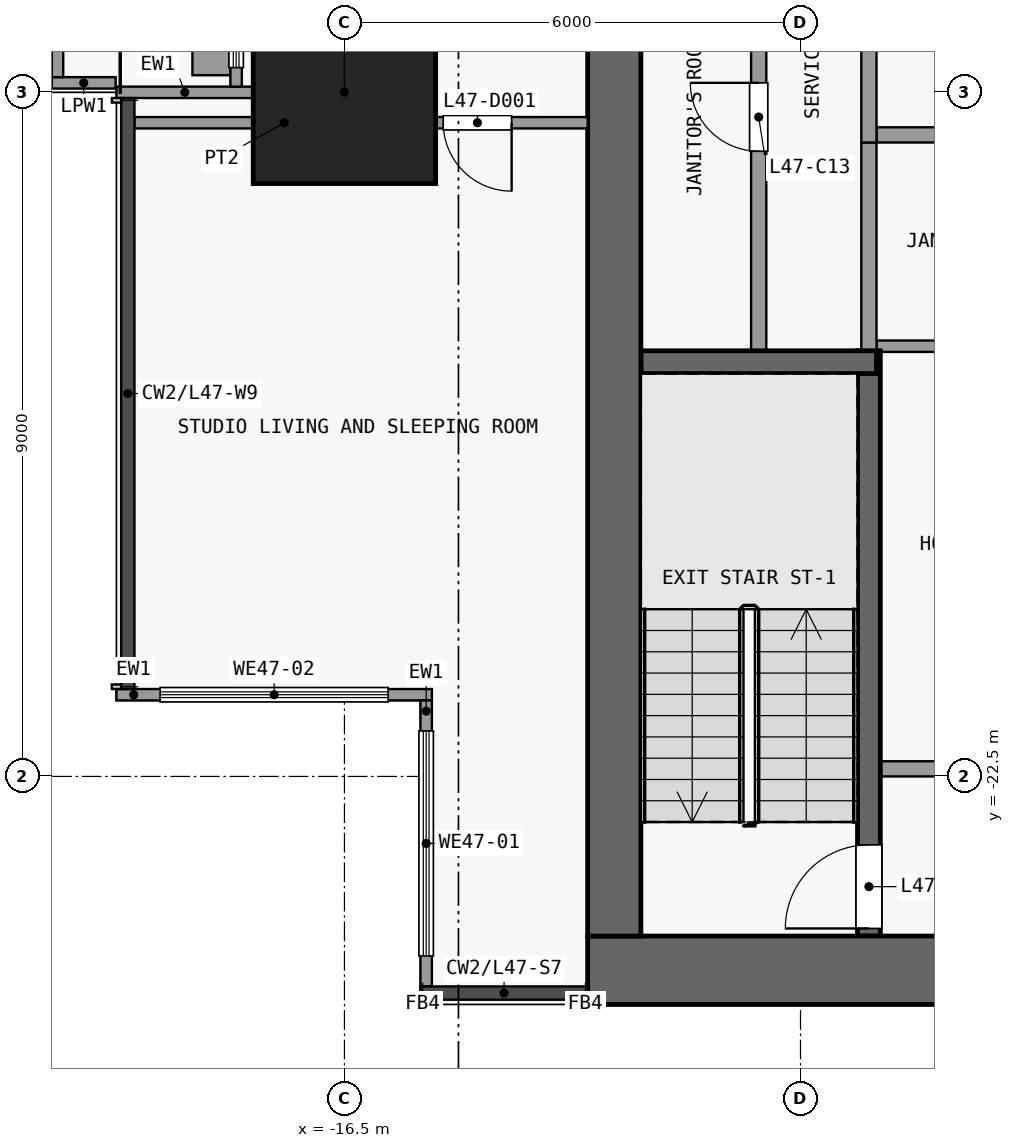
"""IFC4 building model, lengths in metres.
Left out: names, types, materials, properties, quantities, classifications, styles, units other than length and angle.
Written with IfcOpenShell. Run it as: python <this file> out.ifc"""

import sys

from ifc_helpers import new_model, si_unit, direction, frame, frame_2d, origin, origin_2d, place, context, subcontext, project, spatial, rectangle, extrude, element, fill, save


model = new_model("IFC4")
c1 = context("Model", 3, precision=1e-05, world=origin(), true_north=direction((0.0, 1.0)))
c2 = subcontext(c1, "Body", "Model", "MODEL_VIEW")
j1 = project(units=[si_unit("LENGTHUNIT", "METRE"), si_unit("PLANEANGLEUNIT", "RADIAN")], contexts=[c1])
p1 = place(None, origin())
s1 = spatial("IfcSite", under=j1, at=p1, CompositionType="ELEMENT")
p2 = place(p1, origin())
s2 = spatial("IfcBuilding", under=s1, at=p2, CompositionType="ELEMENT")
p3 = place(p2, frame((0.0, 0.0, 188.9)))
s3 = spatial("IfcBuildingStorey", under=s2, at=p3, CompositionType="ELEMENT", Elevation=188.9)
p4 = place(p3, frame((-16.5, -13.5, 0.0), z_axis=(0.0, 0.0, 1.0), x_axis=(1.0, 0.0, 0.0)))
e1 = element("IfcColumn", 1, at=p4, inside=s3, PredefinedType="COLUMN", context=c2, shape_type="SweptSolid", body=[
    extrude(rectangle(XDim=2.4, YDim=2.4, at=origin_2d()), origin(), (0.0, 0.0, 1.0), 3.6),
])
p5 = place(p3, frame((-13.3, -25.05, 0.0), z_axis=(0.0, 0.0, 1.0), x_axis=(1.0, 0.0, 0.0)))
e2 = element("IfcWall", 2, at=p5, inside=s3, PredefinedType="SHEAR", context=c2, shape_type="SweptSolid", body=[
    extrude(rectangle(XDim=26.6, YDim=0.9, at=frame_2d((13.3, 0.0))), origin(), (0.0, 0.0, 1.0), 3.3),
])
p6 = place(p3, frame((-12.95, -24.6, 0.0), z_axis=(0.0, 0.0, 1.0), x_axis=(0.0, 1.0, 0.0)))
e3 = element("IfcWall", 3, at=p6, inside=s3, PredefinedType="SHEAR", context=c2, shape_type="SweptSolid", body=[
    extrude(rectangle(XDim=16.1, YDim=0.7, at=frame_2d((8.05, 0.0))), origin(), (0.0, 0.0, 1.0), 3.3),
])
p7 = place(p3, frame((-3.25, -22.4, 0.0), z_axis=(0.0, 0.0, 1.0), x_axis=(-1.0, 0.0, 0.0)))
e4 = element("IfcWall", 4, at=p7, inside=s3, PredefinedType="PARTITIONING", context=c2, shape_type="SweptSolid", body=[
    extrude(rectangle(XDim=6.2, YDim=0.2, at=frame_2d((3.1, 0.0))), origin(), (0.0, 0.0, 1.0), 3.3),
])
p8 = place(p7, frame((0.8, 0.0, 0.0)))
e5 = element("IfcOpeningElement", 5, at=p8, cuts=e4, PredefinedType="OPENING", context=c2, shape_type="SweptSolid", body=[
    extrude(rectangle(XDim=1.5, YDim=2.1, at=frame_2d((0.75, 1.05))), frame((0.0, 0.11, 0.0), z_axis=(0.0, -1.0, 0.0), x_axis=(1.0, 0.0, 0.0)), (0.0, 0.0, 1.0), 0.22),
])
p9 = place(p3, frame((-12.6, -17.05, 0.0), z_axis=(0.0, 0.0, 1.0), x_axis=(1.0, 0.0, 0.0)))
e6 = element("IfcWall", 6, at=p9, inside=s3, PredefinedType="SHEAR", context=c2, shape_type="SweptSolid", body=[
    extrude(rectangle(XDim=3.1, YDim=0.3, at=frame_2d((1.55, 0.0))), origin(), (0.0, 0.0, 1.0), 3.3),
])
p10 = place(p3, frame((-9.5, -16.84, 0.0), z_axis=(0.0, 0.0, 1.0), x_axis=(1.0, 0.0, 0.0)))
e7 = element("IfcWall", 7, at=p10, inside=s3, PredefinedType="PARTITIONING", context=c2, shape_type="SweptSolid", body=[
    extrude(rectangle(XDim=2.925, YDim=0.15, at=frame_2d((1.462, 0.0))), origin(), (0.0, 0.0, 1.0), 3.3),
])
p11 = place(p3, frame((-9.5, -14.06, 0.0), z_axis=(0.0, 0.0, 1.0), x_axis=(1.0, 0.0, 0.0)))
e8 = element("IfcWall", 8, at=p11, inside=s3, PredefinedType="PARTITIONING", context=c2, shape_type="SweptSolid", body=[
    extrude(rectangle(XDim=2.9, YDim=0.2, at=frame_2d((1.45, 0.0))), origin(), (0.0, 0.0, 1.0), 3.3),
])
p12 = place(p3, frame((-11.05, -16.9, 0.0), z_axis=(0.0, 0.0, 1.0), x_axis=(0.0, 1.0, 0.0)))
e9 = element("IfcWall", 9, at=p12, inside=s3, PredefinedType="PARTITIONING", context=c2, shape_type="SweptSolid", body=[
    extrude(rectangle(XDim=6.4, YDim=0.2, at=frame_2d((3.2, 0.0))), origin(), (0.0, 0.0, 1.0), 3.3),
])
p13 = place(p12, frame((2.625, 0.0, 0.0)))
e10 = element("IfcOpeningElement", 10, at=p13, cuts=e9, PredefinedType="OPENING", context=c2, shape_type="SweptSolid", body=[
    extrude(rectangle(XDim=0.9, YDim=2.1, at=frame_2d((0.45, 1.05))), frame((0.0, 0.11, 0.0), z_axis=(0.0, -1.0, 0.0), x_axis=(1.0, 0.0, 0.0)), (0.0, 0.0, 1.0), 0.22),
])
p14 = place(p3, frame((-9.6, -24.6, 0.0), z_axis=(0.0, 0.0, 1.0), x_axis=(0.0, 1.0, 0.0)))
e11 = element("IfcWall", 11, at=p14, inside=s3, PredefinedType="SHEAR", context=c2, shape_type="SweptSolid", body=[
    extrude(rectangle(XDim=7.7, YDim=0.3, at=frame_2d((3.85, 0.0))), origin(), (0.0, 0.0, 1.0), 3.3),
])
p15 = place(p14, frame((0.1, 0.0, 0.0)))
e12 = element("IfcOpeningElement", 12, at=p15, cuts=e11, PredefinedType="OPENING", context=c2, shape_type="SweptSolid", body=[
    extrude(rectangle(XDim=1.1, YDim=2.1, at=frame_2d((0.55, 1.05))), frame((0.0, 0.16, 0.0), z_axis=(0.0, -1.0, 0.0), x_axis=(1.0, 0.0, 0.0)), (0.0, 0.0, 1.0), 0.32),
])
p16 = place(p3, frame((-9.6, -16.9, 0.0), z_axis=(0.0, 0.0, 1.0), x_axis=(0.0, 1.0, 0.0)))
e13 = element("IfcWall", 13, at=p16, inside=s3, PredefinedType="PARTITIONING", context=c2, shape_type="SweptSolid", body=[
    extrude(rectangle(XDim=2.74, YDim=0.2, at=frame_2d((1.37, 0.0))), origin(), (0.0, 0.0, 1.0), 3.3),
])
p17 = place(p3, frame((-9.6, -14.16, 0.0), z_axis=(0.0, 0.0, 1.0), x_axis=(0.0, 1.0, 0.0)))
e14 = element("IfcWall", 14, at=p17, inside=s3, PredefinedType="PARTITIONING", context=c2, shape_type="SweptSolid", body=[
    extrude(rectangle(XDim=5.66, YDim=0.2, at=frame_2d((2.83, 0.0))), origin(), (0.0, 0.0, 1.0), 3.3),
])
p18 = place(p3, frame((-15.425, -25.262, 0.0), z_axis=(0.0, 0.0, 1.0), x_axis=(0.0, 1.0, 0.0)))
e15 = element("IfcWall", 15, at=p18, inside=s3, PredefinedType="SOLIDWALL", context=c2, shape_type="SweptSolid", body=[
    extrude(rectangle(XDim=3.762, YDim=0.15, at=frame_2d((1.881, 0.0))), origin(), (0.0, 0.0, 1.0), 3.3),
])
p19 = place(p18, frame((0.401, 0.0, 0.9)))
e16 = element("IfcOpeningElement", 16, at=p19, cuts=e15, PredefinedType="OPENING", context=c2, shape_type="SweptSolid", body=[
    extrude(rectangle(XDim=2.96, YDim=2.4, at=frame_2d((1.48, 1.2))), frame((0.0, 0.085, 0.0), z_axis=(0.0, -1.0, 0.0), x_axis=(1.0, 0.0, 0.0)), (0.0, 0.0, 1.0), 0.17),
])
p20 = place(p3, frame((-15.35, -21.425, 0.0), z_axis=(0.0, 0.0, 1.0), x_axis=(-1.0, 0.0, 0.0)))
e17 = element("IfcWall", 17, at=p20, inside=s3, PredefinedType="SOLIDWALL", context=c2, shape_type="SweptSolid", body=[
    extrude(rectangle(XDim=4.15, YDim=0.15, at=frame_2d((2.075, 0.0))), origin(), (0.0, 0.0, 1.0), 3.3),
])
p21 = place(p20, frame((0.575, 0.0, 0.9)))
e18 = element("IfcOpeningElement", 18, at=p21, cuts=e17, PredefinedType="OPENING", context=c2, shape_type="SweptSolid", body=[
    extrude(rectangle(XDim=3.0, YDim=2.4, at=frame_2d((1.5, 1.2))), frame((0.0, 0.085, 0.0), z_axis=(0.0, -1.0, 0.0), x_axis=(1.0, 0.0, 0.0)), (0.0, 0.0, 1.0), 0.17),
])
p22 = place(p3, frame((-17.7, -13.5, 0.0), z_axis=(0.0, 0.0, 1.0), x_axis=(-1.0, 0.0, 0.0)))
e19 = element("IfcWall", 19, at=p22, inside=s3, PredefinedType="SOLIDWALL", context=c2, shape_type="SweptSolid", body=[
    extrude(rectangle(XDim=1.8, YDim=0.15, at=frame_2d((0.9, 0.0))), origin(), (0.0, 0.0, 1.0), 3.3),
])
p23 = place(p3, frame((-17.925, -13.425, 0.0), z_axis=(0.0, 0.0, 1.0), x_axis=(0.0, 1.0, 0.0)))
e20 = element("IfcWall", 20, at=p23, inside=s3, PredefinedType="SOLIDWALL", context=c2, shape_type="SweptSolid", body=[
    extrude(rectangle(XDim=8.925, YDim=0.15, at=frame_2d((4.462, 0.0))), origin(), (0.0, 0.0, 1.0), 3.3),
])
p24 = place(p23, frame((3.05, 0.0, 0.0)))
e21 = element("IfcOpeningElement", 21, at=p24, cuts=e20, PredefinedType="OPENING", context=c2, shape_type="SweptSolid", body=[
    extrude(rectangle(XDim=1.2, YDim=2.4, at=frame_2d((0.6, 1.2))), frame((0.0, 0.085, 0.0), z_axis=(0.0, -1.0, 0.0), x_axis=(1.0, 0.0, 0.0)), (0.0, 0.0, 1.0), 0.17),
])
p25 = place(p23, frame((0.25, 0.0, 0.9)))
e22 = element("IfcOpeningElement", 22, at=p25, cuts=e20, PredefinedType="OPENING", context=c2, shape_type="SweptSolid", body=[
    extrude(rectangle(XDim=2.05, YDim=2.1, at=frame_2d((1.025, 1.05))), frame((0.0, 0.085, 0.0), z_axis=(0.0, -1.0, 0.0), x_axis=(1.0, 0.0, 0.0)), (0.0, 0.0, 1.0), 0.17),
])
p26 = place(p23, frame((5.775, 0.0, 0.9)))
e23 = element("IfcOpeningElement", 23, at=p26, cuts=e20, PredefinedType="OPENING", context=c2, shape_type="SweptSolid", body=[
    extrude(rectangle(XDim=2.312, YDim=2.1, at=frame_2d((1.156, 1.05))), frame((0.0, 0.085, 0.0), z_axis=(0.0, -1.0, 0.0), x_axis=(1.0, 0.0, 0.0)), (0.0, 0.0, 1.0), 0.17),
])
p27 = place(p3, frame((-18.25, -13.275, 0.0), z_axis=(0.0, 0.0, 1.0), x_axis=(0.0, 1.0, 0.0)))
e24 = element("IfcWall", 24, at=p27, inside=s3, PredefinedType="USERDEFINED", context=c2, shape_type="SweptSolid", body=[
    extrude(rectangle(XDim=1.2, YDim=0.5, at=frame_2d((0.6, 0.0))), origin(), (0.0, 0.0, 1.0), 0.9),
])
p28 = place(p3, frame((-19.51, -13.375, 0.0), z_axis=(0.0, 0.0, 1.0), x_axis=(-1.0, 0.0, 0.0)))
e25 = element("IfcWall", 25, at=p28, inside=s3, PredefinedType="PARAPET", context=c2, shape_type="SweptSolid", body=[
    extrude(rectangle(XDim=0.84, YDim=0.15, at=frame_2d((0.42, 0.0))), origin(), (0.0, 0.0, 1.0), 1.15),
])
p29 = place(p3, frame((-20.275, -13.3, 0.0), z_axis=(0.0, 0.0, 1.0), x_axis=(0.0, 1.0, 0.0)))
e26 = element("IfcWall", 26, at=p29, inside=s3, PredefinedType="PARAPET", context=c2, shape_type="SweptSolid", body=[
    extrude(rectangle(XDim=14.79, YDim=0.15, at=frame_2d((7.395, 0.0))), origin(), (0.0, 0.0, 1.0), 1.15),
])
p30 = place(p3, frame((-19.262, -13.9, 0.0), z_axis=(0.0, 0.0, 1.0), x_axis=(1.0, 0.0, 0.0)))
e27 = element("IfcWall", 27, at=p30, inside=s3, PredefinedType="PARTITIONING", context=c2, shape_type="SweptSolid", body=[
    extrude(rectangle(XDim=5.962, YDim=0.15, at=frame_2d((2.981, 0.0))), origin(), (0.0, 0.0, 1.0), 3.3),
])
p31 = place(p30, frame((4.062, 0.0, 0.0)))
e28 = element("IfcOpeningElement", 28, at=p31, cuts=e27, PredefinedType="OPENING", context=c2, shape_type="SweptSolid", body=[
    extrude(rectangle(XDim=0.9, YDim=2.1, at=frame_2d((0.45, 1.05))), frame((0.0, 0.085, 0.0), z_axis=(0.0, -1.0, 0.0), x_axis=(1.0, 0.0, 0.0)), (0.0, 0.0, 1.0), 0.17),
])
p32 = place(p3, frame((-16.3, -13.825, 0.0), z_axis=(0.0, 0.0, 1.0), x_axis=(0.0, 1.0, 0.0)))
e29 = element("IfcWall", 29, at=p32, inside=s3, PredefinedType="PARTITIONING", context=c2, shape_type="SweptSolid", body=[
    extrude(rectangle(XDim=2.85, YDim=0.15, at=frame_2d((1.425, 0.0))), origin(), (0.0, 0.0, 1.0), 3.3),
])
p33 = place(p13, origin())
e30 = element("IfcDoor", 30, at=p33, inside=s3, OperationType="SINGLE_SWING_RIGHT", PredefinedType="DOOR", context=c2, shape_type="SweptSolid", body=[
    extrude(rectangle(XDim=0.9, YDim=2.1, at=frame_2d((0.45, 1.05))), frame((0.0, 0.025, 0.0), z_axis=(0.0, -1.0, 0.0), x_axis=(1.0, 0.0, 0.0)), (0.0, 0.0, 1.0), 0.05),
])
fill(e10, e30)
p34 = place(p15, origin())
e31 = element("IfcDoor", 31, at=p34, inside=s3, OperationType="SINGLE_SWING_LEFT", PredefinedType="DOOR", context=c2, shape_type="SweptSolid", body=[
    extrude(rectangle(XDim=1.1, YDim=2.1, at=frame_2d((0.55, 1.05))), frame((0.0, 0.025, 0.0), z_axis=(0.0, -1.0, 0.0), x_axis=(1.0, 0.0, 0.0)), (0.0, 0.0, 1.0), 0.05),
])
fill(e12, e31)
p35 = place(p19, origin())
e32 = element("IfcWindow", 32, at=p35, inside=s3, PartitioningType="SINGLE_PANEL", PredefinedType="WINDOW", context=c2, shape_type="SweptSolid", body=[
    extrude(rectangle(XDim=2.96, YDim=2.4, at=frame_2d((1.48, 1.2))), frame((0.0, 0.03, 0.0), z_axis=(0.0, -1.0, 0.0), x_axis=(1.0, 0.0, 0.0)), (0.0, 0.0, 1.0), 0.06),
])
fill(e16, e32)
p36 = place(p21, origin())
e33 = element("IfcWindow", 33, at=p36, inside=s3, PartitioningType="SINGLE_PANEL", PredefinedType="WINDOW", context=c2, shape_type="SweptSolid", body=[
    extrude(rectangle(XDim=3.0, YDim=2.4, at=frame_2d((1.5, 1.2))), frame((0.0, 0.03, 0.0), z_axis=(0.0, -1.0, 0.0), x_axis=(1.0, 0.0, 0.0)), (0.0, 0.0, 1.0), 0.06),
])
fill(e18, e33)
p37 = place(p25, origin())
e34 = element("IfcWindow", 34, at=p37, inside=s3, PartitioningType="SINGLE_PANEL", PredefinedType="WINDOW", context=c2, shape_type="SweptSolid", body=[
    extrude(rectangle(XDim=2.05, YDim=2.1, at=frame_2d((1.025, 1.05))), frame((0.0, 0.03, 0.0), z_axis=(0.0, -1.0, 0.0), x_axis=(1.0, 0.0, 0.0)), (0.0, 0.0, 1.0), 0.06),
])
fill(e22, e34)
p38 = place(p31, origin())
e35 = element("IfcDoor", 35, at=p38, inside=s3, OperationType="SINGLE_SWING_RIGHT", PredefinedType="DOOR", context=c2, shape_type="SweptSolid", body=[
    extrude(rectangle(XDim=0.9, YDim=2.1, at=frame_2d((0.45, 1.05))), frame((0.0, 0.025, 0.0), z_axis=(0.0, -1.0, 0.0), x_axis=(1.0, 0.0, 0.0)), (0.0, 0.0, 1.0), 0.05),
])
fill(e28, e35)
save(model, sys.argv[1])
